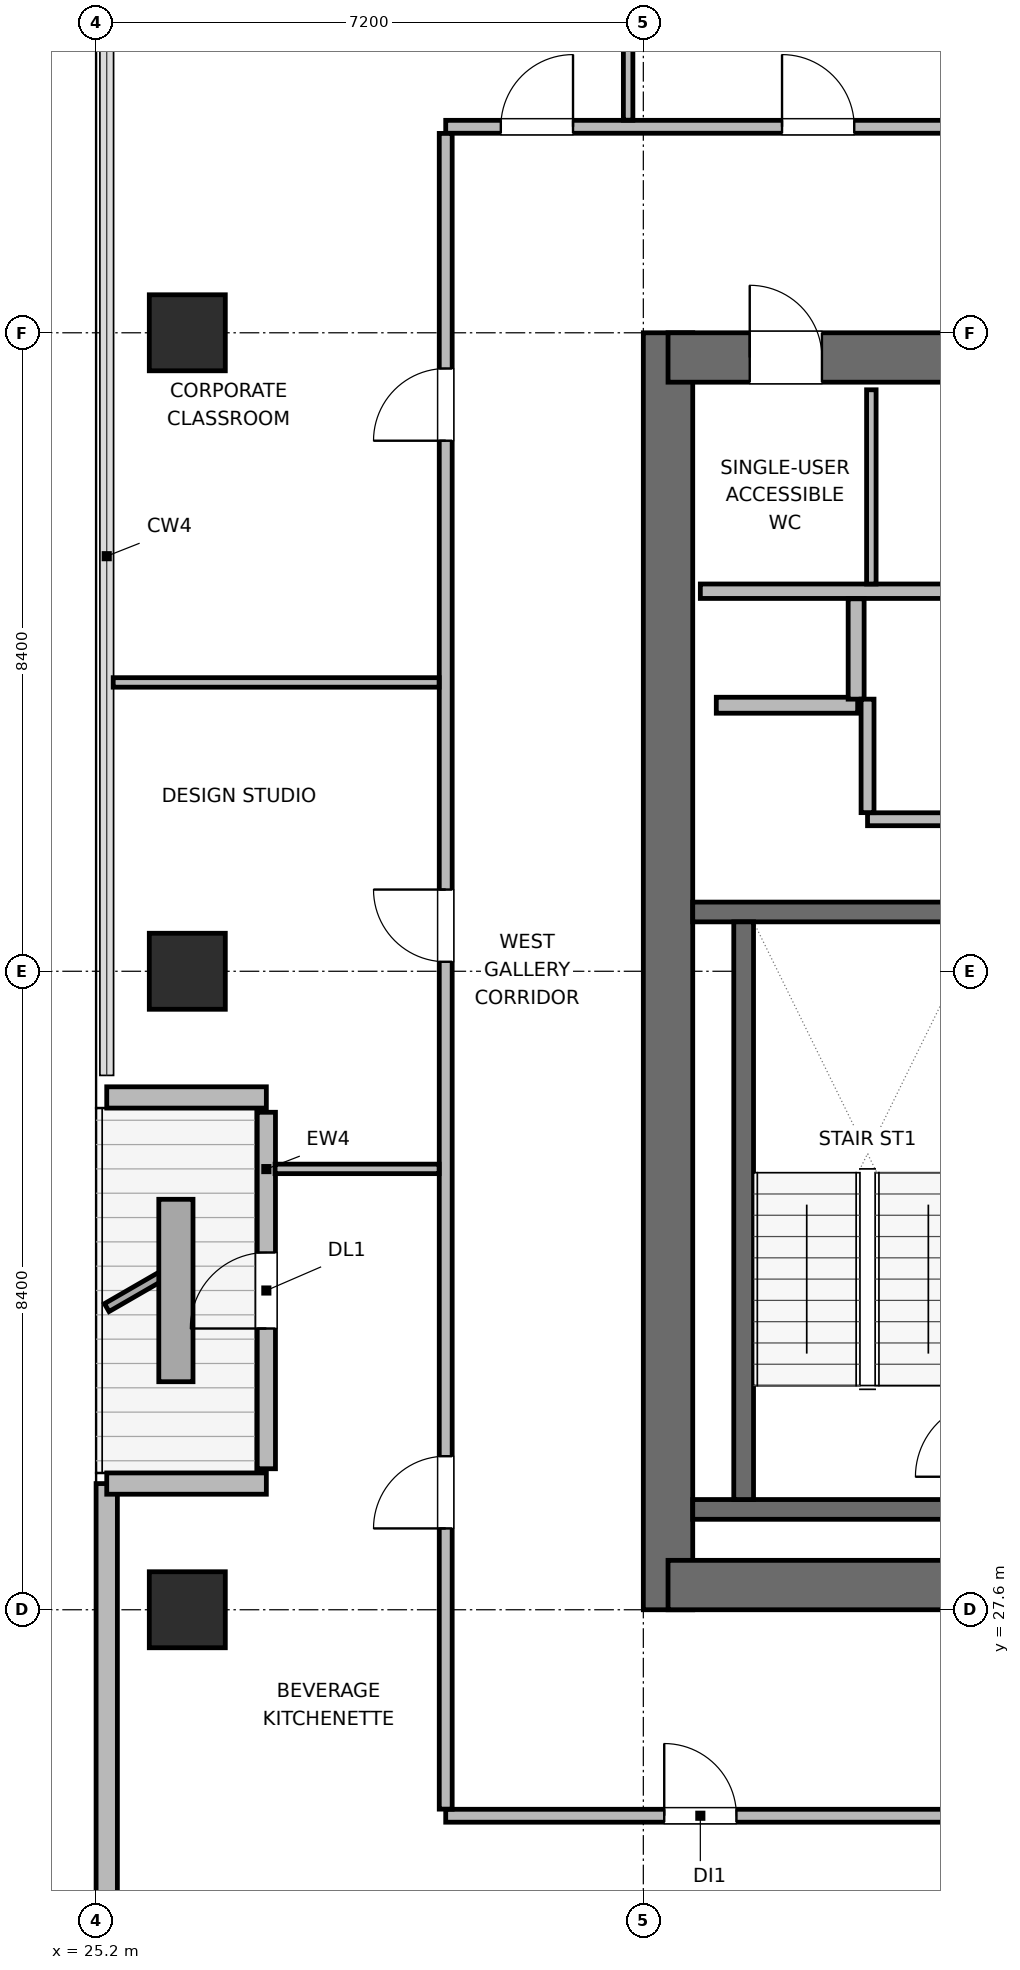
"""IFC4 building model, lengths in metres.
Left out: names, types, materials, properties, quantities, classifications, styles, units other than length and angle.
Written with IfcOpenShell. Run it as: python <this file> out.ifc"""

import sys

from ifc_helpers import new_model, si_unit, direction, frame, frame_2d, origin, origin_2d, place, context, subcontext, project, spatial, rectangle, extrude, element, fill, save


model = new_model("IFC4")
c1 = context("Model", 3, precision=1e-05, world=origin(), true_north=direction((0.0, 1.0)))
c2 = subcontext(c1, "Body", "Model", "MODEL_VIEW")
j1 = project(units=[si_unit("LENGTHUNIT", "METRE"), si_unit("PLANEANGLEUNIT", "RADIAN")], contexts=[c1])
p1 = place(None, origin())
s1 = spatial("IfcSite", under=j1, at=p1, CompositionType="ELEMENT")
p2 = place(p1, origin())
s2 = spatial("IfcBuilding", under=s1, at=p2, CompositionType="ELEMENT")
p3 = place(p2, frame((0.0, 0.0, 258.9)))
s3 = spatial("IfcBuildingStorey", under=s2, at=p3, CompositionType="ELEMENT", Elevation=258.9)
p4 = place(p3, frame((32.725, 27.6, 0.0), z_axis=(0.0, 0.0, 1.0), x_axis=(0.0, 1.0, 0.0)))
e1 = element("IfcWall", 1, at=p4, inside=s3, PredefinedType="SHEAR", context=c2, shape_type="SweptSolid", body=[
    extrude(rectangle(XDim=16.8, YDim=0.65, at=frame_2d((8.4, 0.0))), origin(), (0.0, 0.0, 1.0), 3.9),
])
p5 = place(p3, frame((32.725, 27.925, 0.0), z_axis=(0.0, 0.0, 1.0), x_axis=(1.0, 0.0, 0.0)))
e2 = element("IfcWall", 2, at=p5, inside=s3, PredefinedType="SHEAR", context=c2, shape_type="SweptSolid", body=[
    extrude(rectangle(XDim=9.35, YDim=0.65, at=frame_2d((4.675, 0.0))), origin(), (0.0, 0.0, 1.0), 3.9),
])
p6 = place(p5, frame((5.075, 0.0, 0.0)))
e3 = element("IfcOpeningElement", 3, at=p6, cuts=e2, PredefinedType="OPENING", context=c2, shape_type="SweptSolid", body=[
    extrude(rectangle(XDim=1.05, YDim=2.04, at=frame_2d((0.525, 1.02))), frame((0.0, 0.335, 0.0), z_axis=(0.0, -1.0, 0.0), x_axis=(1.0, 0.0, 0.0)), (0.0, 0.0, 1.0), 0.67),
])
p7 = place(p3, frame((32.725, 44.075, 0.0), z_axis=(0.0, 0.0, 1.0), x_axis=(1.0, 0.0, 0.0)))
e4 = element("IfcWall", 4, at=p7, inside=s3, PredefinedType="SHEAR", context=c2, shape_type="SweptSolid", body=[
    extrude(rectangle(XDim=9.35, YDim=0.65, at=frame_2d((4.675, 0.0))), origin(), (0.0, 0.0, 1.0), 3.9),
])
p8 = place(p7, frame((1.075, 0.0, 0.0)))
e5 = element("IfcOpeningElement", 5, at=p8, cuts=e4, PredefinedType="OPENING", context=c2, shape_type="SweptSolid", body=[
    extrude(rectangle(XDim=0.95, YDim=2.04, at=frame_2d((0.475, 1.02))), frame((0.0, 0.335, 0.0), z_axis=(0.0, -1.0, 0.0), x_axis=(1.0, 0.0, 0.0)), (0.0, 0.0, 1.0), 0.67),
])
p9 = place(p7, frame((4.325, 0.0, 0.0)))
e6 = element("IfcOpeningElement", 6, at=p9, cuts=e4, PredefinedType="OPENING", context=c2, shape_type="SweptSolid", body=[
    extrude(rectangle(XDim=0.9, YDim=2.02, at=frame_2d((0.45, 1.01))), frame((0.0, 0.335, 0.0), z_axis=(0.0, -1.0, 0.0), x_axis=(1.0, 0.0, 0.0)), (0.0, 0.0, 1.0), 0.67),
])
p10 = place(p7, frame((7.225, 0.0, 0.0)))
e7 = element("IfcOpeningElement", 7, at=p10, cuts=e4, PredefinedType="OPENING", context=c2, shape_type="SweptSolid", body=[
    extrude(rectangle(XDim=0.9, YDim=2.02, at=frame_2d((0.45, 1.01))), frame((0.0, 0.335, 0.0), z_axis=(0.0, -1.0, 0.0), x_axis=(1.0, 0.0, 0.0)), (0.0, 0.0, 1.0), 0.67),
])
for number, where, z_axis, x_axis in (
    (8, (33.05, 28.92, 0.0), (0.0, 0.0, 1.0), (1.0, 0.0, 0.0)),
    (9, (33.05, 36.78, 0.0), (0.0, 0.0, 1.0), (1.0, 0.0, 0.0)),
):
    element("IfcWall", number, at=place(p3, frame(where, z_axis=z_axis, x_axis=x_axis)), inside=s3, PredefinedType="SHEAR", context=c2, shape_type="SweptSolid", body=[
        extrude(rectangle(XDim=4.06, YDim=0.26, at=frame_2d((2.03, 0.0))), origin(), (0.0, 0.0, 1.0), 3.9),
    ])
p11 = place(p3, frame((33.72, 29.05, 0.0), z_axis=(0.0, 0.0, 1.0), x_axis=(0.0, 1.0, 0.0)))
e10 = element("IfcWall", 10, at=p11, inside=s3, PredefinedType="SHEAR", context=c2, shape_type="SweptSolid", body=[
    extrude(rectangle(XDim=7.6, YDim=0.26, at=frame_2d((3.8, 0.0))), origin(), (0.0, 0.0, 1.0), 3.9),
])
for number, where, z_axis, x_axis in (
    (11, (26.4, 27.6, 0.0), (0.0, 0.0, 1.0), (1.0, 0.0, 0.0)),
    (12, (26.4, 36.0, 0.0), (0.0, 0.0, 1.0), (1.0, 0.0, 0.0)),
    (13, (26.4, 44.4, 0.0), (0.0, 0.0, 1.0), (1.0, 0.0, 0.0)),
):
    element("IfcColumn", number, at=place(p3, frame(where, z_axis=z_axis, x_axis=x_axis)), inside=s3, PredefinedType="COLUMN", context=c2, shape_type="SweptSolid", body=[
        extrude(rectangle(XDim=1.0, YDim=1.0, at=origin_2d()), origin(), (0.0, 0.0, 1.0), 3.9),
    ])
p12 = place(p3, frame((25.34, 23.418, 0.0), z_axis=(0.0, 0.0, 1.0), x_axis=(0.0, 1.0, 0.0)))
e14 = element("IfcWall", 14, at=p12, inside=s3, PredefinedType="SOLIDWALL", context=c2, shape_type="SweptSolid", body=[
    extrude(rectangle(XDim=5.842, YDim=0.28, at=frame_2d((2.921, 0.0))), origin(), (0.0, 0.0, 1.0), 3.68),
])
p13 = place(p3, frame((25.34, 29.26, 0.0), z_axis=(0.0, 0.0, 1.0), x_axis=(1.0, 0.0, 0.0)))
e15 = element("IfcWall", 15, at=p13, inside=s3, PredefinedType="SOLIDWALL", context=c2, shape_type="SweptSolid", body=[
    extrude(rectangle(XDim=2.1, YDim=0.28, at=frame_2d((1.05, 0.0))), origin(), (0.0, 0.0, 1.0), 3.126),
])
p14 = place(p3, frame((27.44, 29.455, 0.0), z_axis=(0.0, 0.0, 1.0), x_axis=(0.0, 1.0, 0.0)))
e16 = element("IfcWall", 16, at=p14, inside=s3, PredefinedType="SOLIDWALL", context=c2, shape_type="SweptSolid", body=[
    extrude(rectangle(XDim=4.69, YDim=0.24, at=frame_2d((2.345, 0.0))), origin(), (0.0, 0.0, 1.0), 3.311),
])
p15 = place(p14, frame((1.845, 0.0, 0.0)))
e17 = element("IfcOpeningElement", 17, at=p15, cuts=e16, PredefinedType="OPENING", context=c2, shape_type="SweptSolid", body=[
    extrude(rectangle(XDim=1.0, YDim=2.02, at=frame_2d((0.5, 1.01))), frame((0.0, 0.13, 0.0), z_axis=(0.0, -1.0, 0.0), x_axis=(1.0, 0.0, 0.0)), (0.0, 0.0, 1.0), 0.26),
])
p16 = place(p3, frame((27.44, 34.34, 0.0), z_axis=(0.0, 0.0, 1.0), x_axis=(-1.0, 0.0, 0.0)))
e18 = element("IfcWall", 18, at=p16, inside=s3, PredefinedType="SOLIDWALL", context=c2, shape_type="SweptSolid", body=[
    extrude(rectangle(XDim=2.1, YDim=0.28, at=frame_2d((1.05, 0.0))), origin(), (0.0, 0.0, 1.0), 3.126),
])
p17 = place(p3, frame((33.15, 41.0, 0.0), z_axis=(0.0, 0.0, 1.0), x_axis=(1.0, 0.0, 0.0)))
e19 = element("IfcWall", 19, at=p17, inside=s3, PredefinedType="PLUMBINGWALL", context=c2, shape_type="SweptSolid", body=[
    extrude(rectangle(XDim=8.5, YDim=0.19, at=frame_2d((4.25, 0.0))), origin(), (0.0, 0.0, 1.0), 3.68),
])
p18 = place(p3, frame((35.4, 41.095, 0.0), z_axis=(0.0, 0.0, 1.0), x_axis=(0.0, 1.0, 0.0)))
e20 = element("IfcWall", 20, at=p18, inside=s3, PredefinedType="PARTITIONING", context=c2, shape_type="SweptSolid", body=[
    extrude(rectangle(XDim=2.555, YDim=0.125, at=frame_2d((1.277, 0.0))), origin(), (0.0, 0.0, 1.0), 3.68),
])
p19 = place(p3, frame((33.36, 39.5, 0.0), z_axis=(0.0, 0.0, 1.0), x_axis=(1.0, 0.0, 0.0)))
e21 = element("IfcWall", 21, at=p19, inside=s3, PredefinedType="PARTITIONING", context=c2, shape_type="SweptSolid", body=[
    extrude(rectangle(XDim=1.86, YDim=0.21, at=frame_2d((0.93, 0.0))), origin(), (0.0, 0.0, 1.0), 3.68),
])
p20 = place(p3, frame((35.2, 39.58, 0.0), z_axis=(0.0, 0.0, 1.0), x_axis=(0.0, 1.0, 0.0)))
e22 = element("IfcWall", 22, at=p20, inside=s3, PredefinedType="PARTITIONING", context=c2, shape_type="SweptSolid", body=[
    extrude(rectangle(XDim=1.32, YDim=0.21, at=frame_2d((0.66, 0.0))), origin(), (0.0, 0.0, 1.0), 3.68),
])
p21 = place(p3, frame((35.35, 38.0, 0.0), z_axis=(0.0, 0.0, 1.0), x_axis=(1.0, 0.0, 0.0)))
e23 = element("IfcWall", 23, at=p21, inside=s3, PredefinedType="PARTITIONING", context=c2, shape_type="SweptSolid", body=[
    extrude(rectangle(XDim=6.1, YDim=0.17, at=frame_2d((3.05, 0.0))), origin(), (0.0, 0.0, 1.0), 3.68),
])
p22 = place(p21, frame((2.6, 0.0, 0.0)))
e24 = element("IfcOpeningElement", 24, at=p22, cuts=e23, PredefinedType="OPENING", context=c2, shape_type="SweptSolid", body=[
    extrude(rectangle(XDim=0.9, YDim=2.02, at=frame_2d((0.45, 1.01))), frame((0.0, 0.095, 0.0), z_axis=(0.0, -1.0, 0.0), x_axis=(1.0, 0.0, 0.0)), (0.0, 0.0, 1.0), 0.19),
])
p23 = place(p3, frame((35.35, 38.087, 0.0), z_axis=(0.0, 0.0, 1.0), x_axis=(0.0, 1.0, 0.0)))
e25 = element("IfcWall", 25, at=p23, inside=s3, PredefinedType="PARTITIONING", context=c2, shape_type="SweptSolid", body=[
    extrude(rectangle(XDim=1.493, YDim=0.17, at=frame_2d((0.747, 0.0))), origin(), (0.0, 0.0, 1.0), 3.68),
])
p24 = place(p3, frame((29.8, 24.89, 0.0), z_axis=(0.0, 0.0, 1.0), x_axis=(1.0, 0.0, 0.0)))
e26 = element("IfcWall", 26, at=p24, inside=s3, PredefinedType="PARTITIONING", context=c2, shape_type="SweptSolid", body=[
    extrude(rectangle(XDim=33.8, YDim=0.17, at=frame_2d((16.9, 0.0))), origin(), (0.0, 0.0, 1.0), 3.68),
])
p25 = place(p24, frame((2.875, 0.0, 0.0)))
e27 = element("IfcOpeningElement", 27, at=p25, cuts=e26, PredefinedType="OPENING", context=c2, shape_type="SweptSolid", body=[
    extrude(rectangle(XDim=0.95, YDim=2.04, at=frame_2d((0.475, 1.02))), frame((0.0, 0.095, 0.0), z_axis=(0.0, -1.0, 0.0), x_axis=(1.0, 0.0, 0.0)), (0.0, 0.0, 1.0), 0.19),
])
p26 = place(p24, frame((14.225, 0.0, 0.0)))
e28 = element("IfcOpeningElement", 28, at=p26, cuts=e26, PredefinedType="OPENING", context=c2, shape_type="SweptSolid", body=[
    extrude(rectangle(XDim=0.95, YDim=2.04, at=frame_2d((0.475, 1.02))), frame((0.0, 0.095, 0.0), z_axis=(0.0, -1.0, 0.0), x_axis=(1.0, 0.0, 0.0)), (0.0, 0.0, 1.0), 0.19),
])
p27 = place(p24, frame((27.775, 0.0, 0.0)))
e29 = element("IfcOpeningElement", 29, at=p27, cuts=e26, PredefinedType="OPENING", context=c2, shape_type="SweptSolid", body=[
    extrude(rectangle(XDim=0.95, YDim=2.04, at=frame_2d((0.475, 1.02))), frame((0.0, 0.095, 0.0), z_axis=(0.0, -1.0, 0.0), x_axis=(1.0, 0.0, 0.0)), (0.0, 0.0, 1.0), 0.19),
])
p28 = place(p3, frame((29.8, 47.11, 0.0), z_axis=(0.0, 0.0, 1.0), x_axis=(1.0, 0.0, 0.0)))
e30 = element("IfcWall", 30, at=p28, inside=s3, PredefinedType="PARTITIONING", context=c2, shape_type="SweptSolid", body=[
    extrude(rectangle(XDim=33.8, YDim=0.17, at=frame_2d((16.9, 0.0))), origin(), (0.0, 0.0, 1.0), 3.68),
])
p29 = place(p28, frame((0.725, 0.0, 0.0)))
e31 = element("IfcOpeningElement", 31, at=p29, cuts=e30, PredefinedType="OPENING", context=c2, shape_type="SweptSolid", body=[
    extrude(rectangle(XDim=0.95, YDim=2.04, at=frame_2d((0.475, 1.02))), frame((0.0, 0.095, 0.0), z_axis=(0.0, -1.0, 0.0), x_axis=(1.0, 0.0, 0.0)), (0.0, 0.0, 1.0), 0.19),
])
p30 = place(p28, frame((4.425, 0.0, 0.0)))
e32 = element("IfcOpeningElement", 32, at=p30, cuts=e30, PredefinedType="OPENING", context=c2, shape_type="SweptSolid", body=[
    extrude(rectangle(XDim=0.95, YDim=2.04, at=frame_2d((0.475, 1.02))), frame((0.0, 0.095, 0.0), z_axis=(0.0, -1.0, 0.0), x_axis=(1.0, 0.0, 0.0)), (0.0, 0.0, 1.0), 0.19),
])
p31 = place(p28, frame((9.425, 0.0, 0.0)))
e33 = element("IfcOpeningElement", 33, at=p31, cuts=e30, PredefinedType="OPENING", context=c2, shape_type="SweptSolid", body=[
    extrude(rectangle(XDim=0.95, YDim=2.04, at=frame_2d((0.475, 1.02))), frame((0.0, 0.095, 0.0), z_axis=(0.0, -1.0, 0.0), x_axis=(1.0, 0.0, 0.0)), (0.0, 0.0, 1.0), 0.19),
])
p32 = place(p28, frame((14.925, 0.0, 0.0)))
e34 = element("IfcOpeningElement", 34, at=p32, cuts=e30, PredefinedType="OPENING", context=c2, shape_type="SweptSolid", body=[
    extrude(rectangle(XDim=0.95, YDim=2.04, at=frame_2d((0.475, 1.02))), frame((0.0, 0.095, 0.0), z_axis=(0.0, -1.0, 0.0), x_axis=(1.0, 0.0, 0.0)), (0.0, 0.0, 1.0), 0.19),
])
p33 = place(p28, frame((20.925, 0.0, 0.0)))
e35 = element("IfcOpeningElement", 35, at=p33, cuts=e30, PredefinedType="OPENING", context=c2, shape_type="SweptSolid", body=[
    extrude(rectangle(XDim=0.95, YDim=2.04, at=frame_2d((0.475, 1.02))), frame((0.0, 0.095, 0.0), z_axis=(0.0, -1.0, 0.0), x_axis=(1.0, 0.0, 0.0)), (0.0, 0.0, 1.0), 0.19),
])
p34 = place(p28, frame((26.725, 0.0, 0.0)))
e36 = element("IfcOpeningElement", 36, at=p34, cuts=e30, PredefinedType="OPENING", context=c2, shape_type="SweptSolid", body=[
    extrude(rectangle(XDim=0.95, YDim=2.04, at=frame_2d((0.475, 1.02))), frame((0.0, 0.095, 0.0), z_axis=(0.0, -1.0, 0.0), x_axis=(1.0, 0.0, 0.0)), (0.0, 0.0, 1.0), 0.19),
])
p35 = place(p28, frame((31.425, 0.0, 0.0)))
e37 = element("IfcOpeningElement", 37, at=p35, cuts=e30, PredefinedType="OPENING", context=c2, shape_type="SweptSolid", body=[
    extrude(rectangle(XDim=0.95, YDim=2.04, at=frame_2d((0.475, 1.02))), frame((0.0, 0.095, 0.0), z_axis=(0.0, -1.0, 0.0), x_axis=(1.0, 0.0, 0.0)), (0.0, 0.0, 1.0), 0.19),
])
p36 = place(p3, frame((29.8, 24.977, 0.0), z_axis=(0.0, 0.0, 1.0), x_axis=(0.0, 1.0, 0.0)))
e38 = element("IfcWall", 38, at=p36, inside=s3, PredefinedType="PARTITIONING", context=c2, shape_type="SweptSolid", body=[
    extrude(rectangle(XDim=22.046, YDim=0.17, at=frame_2d((11.023, 0.0))), origin(), (0.0, 0.0, 1.0), 3.68),
])
p37 = place(p36, frame((3.693, 0.0, 0.0)))
e39 = element("IfcOpeningElement", 39, at=p37, cuts=e38, PredefinedType="OPENING", context=c2, shape_type="SweptSolid", body=[
    extrude(rectangle(XDim=0.95, YDim=2.04, at=frame_2d((0.475, 1.02))), frame((0.0, 0.095, 0.0), z_axis=(0.0, -1.0, 0.0), x_axis=(1.0, 0.0, 0.0)), (0.0, 0.0, 1.0), 0.19),
])
p38 = place(p36, frame((11.148, 0.0, 0.0)))
e40 = element("IfcOpeningElement", 40, at=p38, cuts=e38, PredefinedType="OPENING", context=c2, shape_type="SweptSolid", body=[
    extrude(rectangle(XDim=0.95, YDim=2.04, at=frame_2d((0.475, 1.02))), frame((0.0, 0.095, 0.0), z_axis=(0.0, -1.0, 0.0), x_axis=(1.0, 0.0, 0.0)), (0.0, 0.0, 1.0), 0.19),
])
p39 = place(p36, frame((18.003, 0.0, 0.0)))
e41 = element("IfcOpeningElement", 41, at=p39, cuts=e38, PredefinedType="OPENING", context=c2, shape_type="SweptSolid", body=[
    extrude(rectangle(XDim=0.95, YDim=2.04, at=frame_2d((0.475, 1.02))), frame((0.0, 0.095, 0.0), z_axis=(0.0, -1.0, 0.0), x_axis=(1.0, 0.0, 0.0)), (0.0, 0.0, 1.0), 0.19),
])
p40 = place(p3, frame((32.2, 47.197, 0.0), z_axis=(0.0, 0.0, 1.0), x_axis=(0.0, 1.0, 0.0)))
e42 = element("IfcWall", 42, at=p40, inside=s3, PredefinedType="PARTITIONING", context=c2, shape_type="SweptSolid", body=[
    extrude(rectangle(XDim=5.968, YDim=0.125, at=frame_2d((2.984, 0.0))), origin(), (0.0, 0.0, 1.0), 3.054),
])
p41 = place(p3, frame((27.555, 33.4, 0.0), z_axis=(0.0, 0.0, 1.0), x_axis=(1.0, 0.0, 0.0)))
e43 = element("IfcWall", 43, at=p41, inside=s3, PredefinedType="PARTITIONING", context=c2, shape_type="SweptSolid", body=[
    extrude(rectangle(XDim=2.158, YDim=0.125, at=frame_2d((1.079, 0.0))), origin(), (0.0, 0.0, 1.0), 3.68),
])
p42 = place(p3, frame((25.425, 39.8, 0.0), z_axis=(0.0, 0.0, 1.0), x_axis=(1.0, 0.0, 0.0)))
e44 = element("IfcWall", 44, at=p42, inside=s3, PredefinedType="PARTITIONING", context=c2, shape_type="SweptSolid", body=[
    extrude(rectangle(XDim=4.288, YDim=0.125, at=frame_2d((2.144, 0.0))), origin(), (0.0, 0.0, 1.0), 3.68),
])
p43 = place(p15, origin())
e45 = element("IfcDoor", 45, at=p43, inside=s3, OperationType="SINGLE_SWING_LEFT", PredefinedType="DOOR", context=c2, shape_type="SweptSolid", body=[
    extrude(rectangle(XDim=1.0, YDim=2.02, at=frame_2d((0.5, 1.01))), frame((0.0, 0.025, 0.0), z_axis=(0.0, -1.0, 0.0), x_axis=(1.0, 0.0, 0.0)), (0.0, 0.0, 1.0), 0.05),
])
fill(e17, e45)
p44 = place(p8, origin())
e46 = element("IfcDoor", 46, at=p44, inside=s3, OperationType="SINGLE_SWING_LEFT", PredefinedType="DOOR", context=c2, shape_type="SweptSolid", body=[
    extrude(rectangle(XDim=0.95, YDim=2.04, at=frame_2d((0.475, 1.02))), frame((0.0, 0.025, 0.0), z_axis=(0.0, -1.0, 0.0), x_axis=(1.0, 0.0, 0.0)), (0.0, 0.0, 1.0), 0.05),
])
fill(e5, e46)
p45 = place(p25, origin())
e47 = element("IfcDoor", 47, at=p45, inside=s3, OperationType="SINGLE_SWING_LEFT", PredefinedType="DOOR", context=c2, shape_type="SweptSolid", body=[
    extrude(rectangle(XDim=0.95, YDim=2.04, at=frame_2d((0.475, 1.02))), frame((0.0, 0.025, 0.0), z_axis=(0.0, -1.0, 0.0), x_axis=(1.0, 0.0, 0.0)), (0.0, 0.0, 1.0), 0.05),
])
fill(e27, e47)
p46 = place(p29, origin())
e48 = element("IfcDoor", 48, at=p46, inside=s3, OperationType="SINGLE_SWING_RIGHT", PredefinedType="DOOR", context=c2, shape_type="SweptSolid", body=[
    extrude(rectangle(XDim=0.95, YDim=2.04, at=frame_2d((0.475, 1.02))), frame((0.0, 0.025, 0.0), z_axis=(0.0, -1.0, 0.0), x_axis=(1.0, 0.0, 0.0)), (0.0, 0.0, 1.0), 0.05),
])
fill(e31, e48)
p47 = place(p30, origin())
e49 = element("IfcDoor", 49, at=p47, inside=s3, OperationType="SINGLE_SWING_LEFT", PredefinedType="DOOR", context=c2, shape_type="SweptSolid", body=[
    extrude(rectangle(XDim=0.95, YDim=2.04, at=frame_2d((0.475, 1.02))), frame((0.0, 0.025, 0.0), z_axis=(0.0, -1.0, 0.0), x_axis=(1.0, 0.0, 0.0)), (0.0, 0.0, 1.0), 0.05),
])
fill(e32, e49)
p48 = place(p37, origin())
e50 = element("IfcDoor", 50, at=p48, inside=s3, OperationType="SINGLE_SWING_LEFT", PredefinedType="DOOR", context=c2, shape_type="SweptSolid", body=[
    extrude(rectangle(XDim=0.95, YDim=2.04, at=frame_2d((0.475, 1.02))), frame((0.0, 0.025, 0.0), z_axis=(0.0, -1.0, 0.0), x_axis=(1.0, 0.0, 0.0)), (0.0, 0.0, 1.0), 0.05),
])
fill(e39, e50)
p49 = place(p38, origin())
e51 = element("IfcDoor", 51, at=p49, inside=s3, OperationType="SINGLE_SWING_RIGHT", PredefinedType="DOOR", context=c2, shape_type="SweptSolid", body=[
    extrude(rectangle(XDim=0.95, YDim=2.04, at=frame_2d((0.475, 1.02))), frame((0.0, 0.025, 0.0), z_axis=(0.0, -1.0, 0.0), x_axis=(1.0, 0.0, 0.0)), (0.0, 0.0, 1.0), 0.05),
])
fill(e40, e51)
p50 = place(p39, origin())
e52 = element("IfcDoor", 52, at=p50, inside=s3, OperationType="SINGLE_SWING_LEFT", PredefinedType="DOOR", context=c2, shape_type="SweptSolid", body=[
    extrude(rectangle(XDim=0.95, YDim=2.04, at=frame_2d((0.475, 1.02))), frame((0.0, 0.025, 0.0), z_axis=(0.0, -1.0, 0.0), x_axis=(1.0, 0.0, 0.0)), (0.0, 0.0, 1.0), 0.05),
])
fill(e41, e52)
save(model, sys.argv[1])
